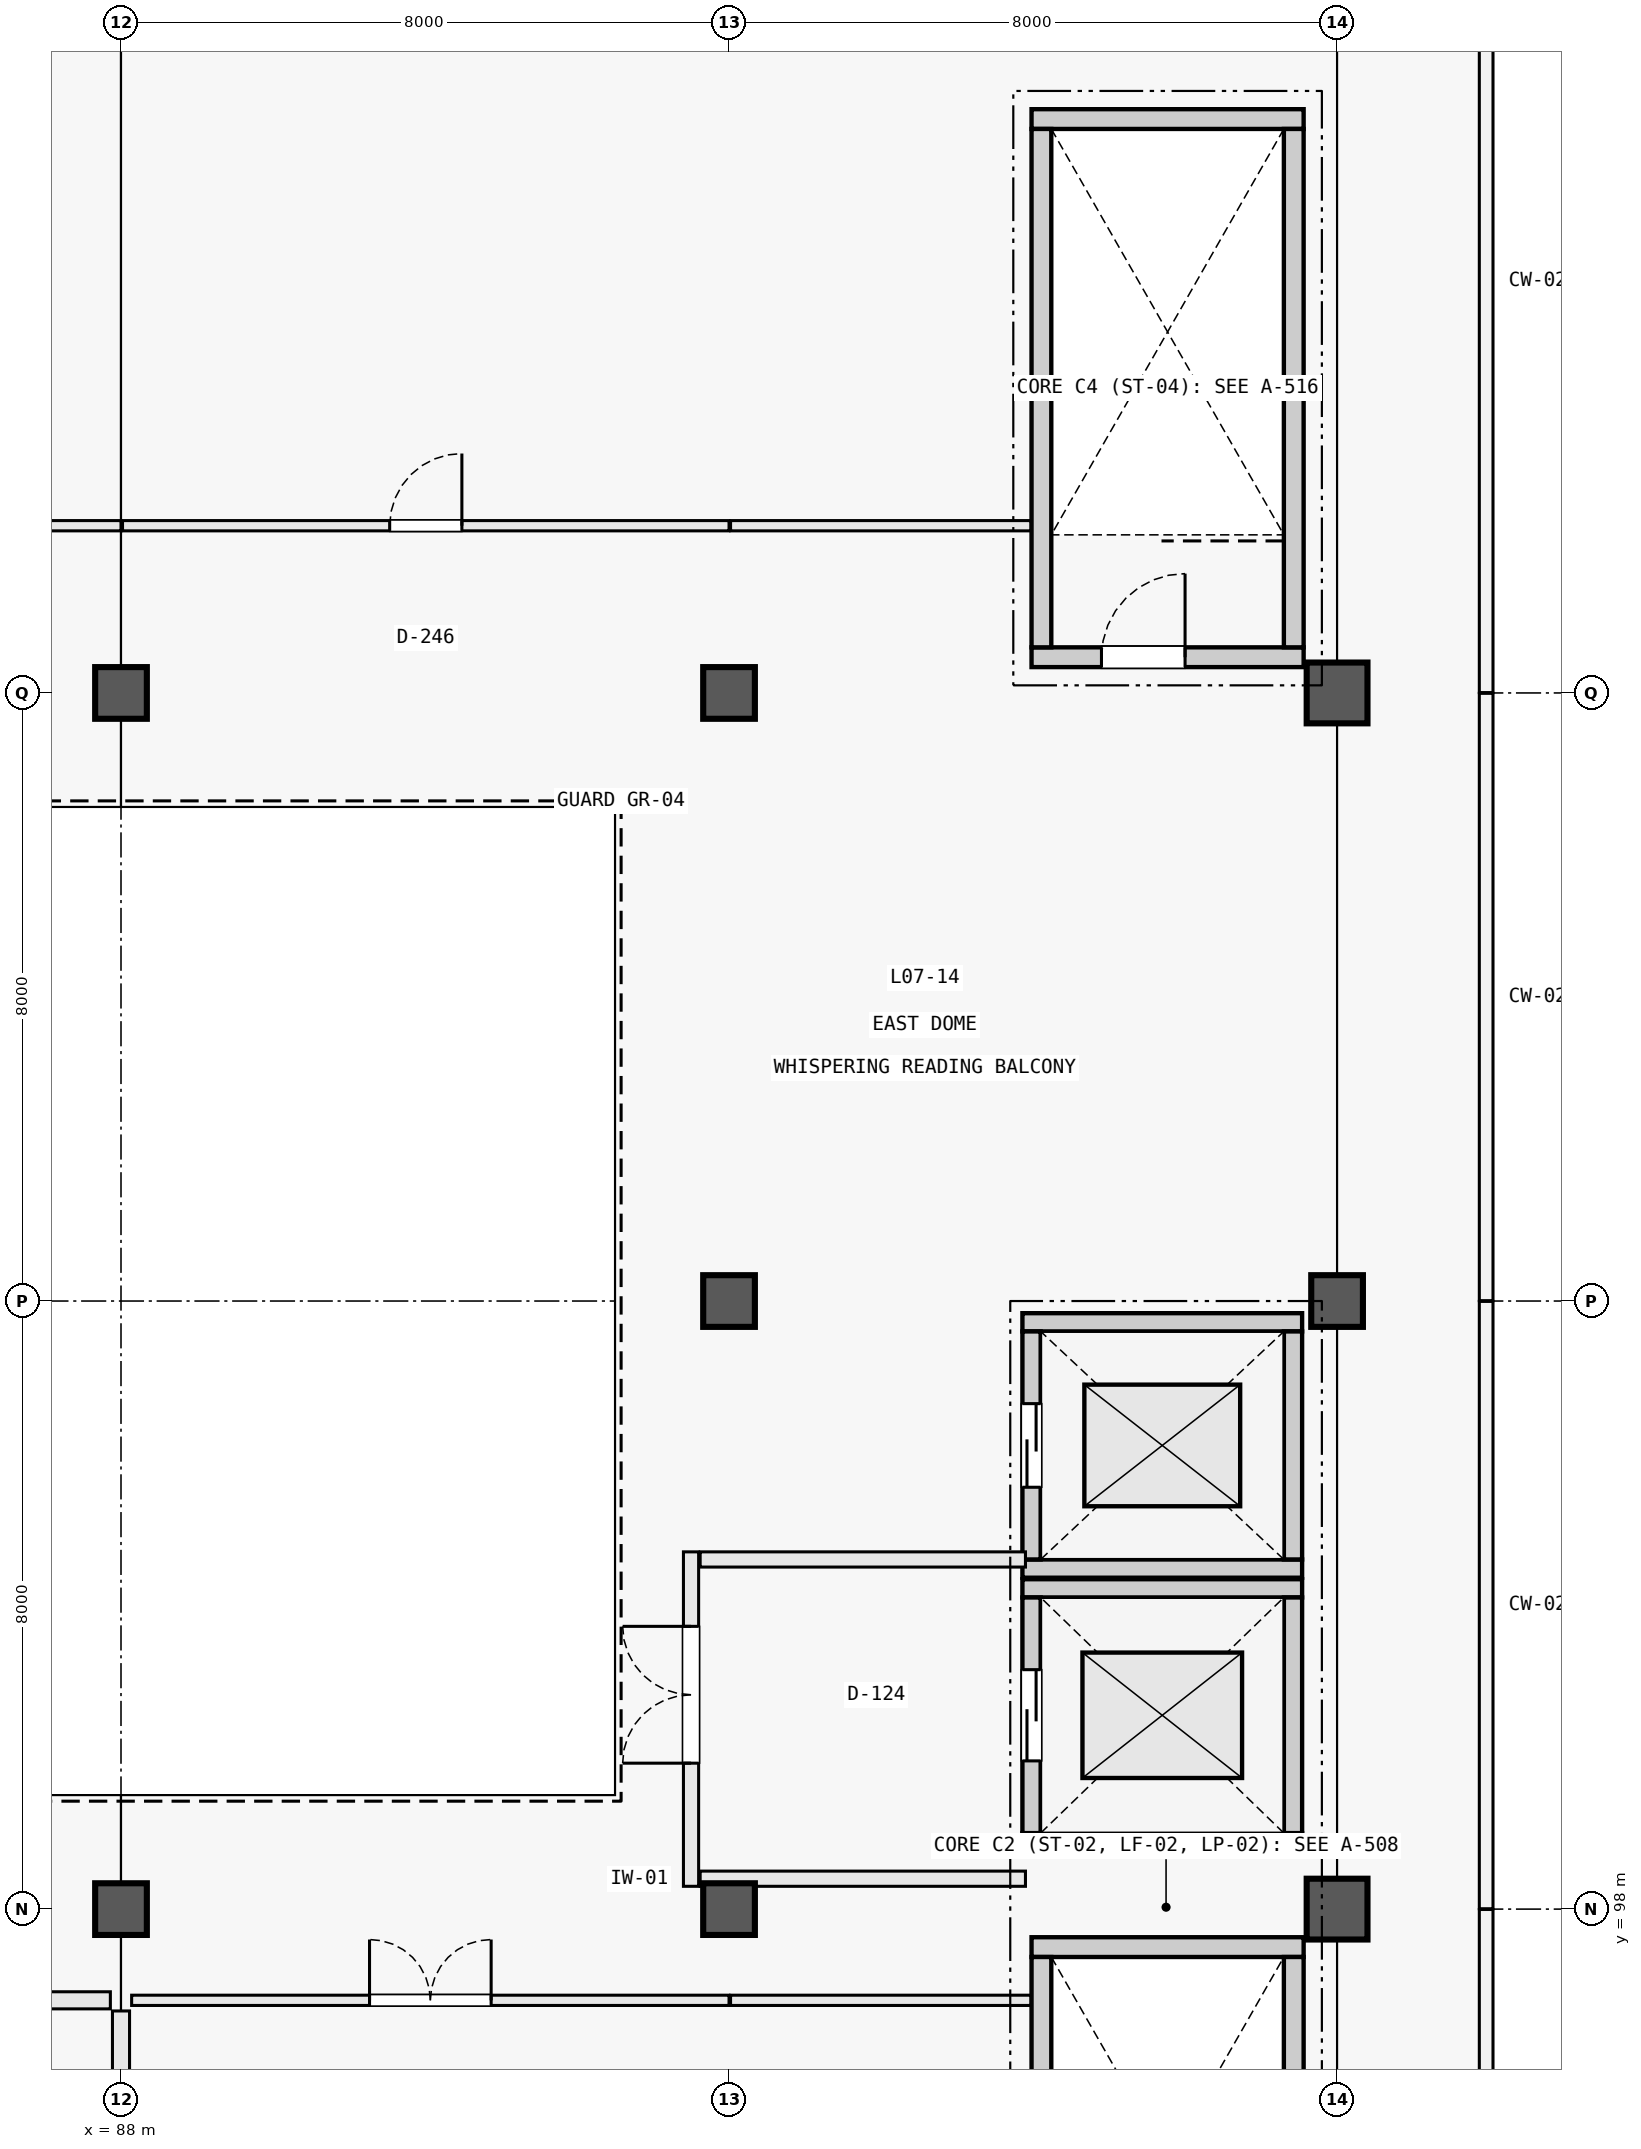
"""IFC4 building model, lengths in metres.
Left out: names, types, materials, properties, quantities, classifications, styles, units other than length and angle.
Written with IfcOpenShell. Run it as: python <this file> out.ifc"""

import sys

from ifc_helpers import new_model, si_unit, direction, frame, frame_2d, origin, origin_2d, place, context, subcontext, project, spatial, rectangle, circle, extrude, element, fill, save


model = new_model("IFC4")
c1 = context("Model", 3, precision=1e-05, world=origin(), true_north=direction((0.0, 1.0)))
c2 = subcontext(c1, "Body", "Model", "MODEL_VIEW")
j1 = project(units=[si_unit("LENGTHUNIT", "METRE"), si_unit("PLANEANGLEUNIT", "RADIAN")], contexts=[c1])
p1 = place(None, origin())
s1 = spatial("IfcSite", under=j1, at=p1, CompositionType="ELEMENT")
p2 = place(p1, origin())
s2 = spatial("IfcBuilding", under=s1, at=p2, CompositionType="ELEMENT")
p3 = place(p2, frame((0.0, 0.0, 30.3)))
s3 = spatial("IfcBuildingStorey", under=s2, at=p3, CompositionType="ELEMENT", Elevation=30.3)
for number, where, z_axis, x_axis in (
    (1, (88.0, 98.0, 0.0), (0.0, 0.0, 1.0), (1.0, 0.0, 0.0)),
    (2, (88.0, 114.0, 0.0), (0.0, 0.0, 1.0), (1.0, 0.0, 0.0)),
    (3, (96.0, 98.0, 0.0), (0.0, 0.0, 1.0), (1.0, 0.0, 0.0)),
    (4, (96.0, 106.0, 0.0), (0.0, 0.0, 1.0), (1.0, 0.0, 0.0)),
    (5, (96.0, 114.0, 0.0), (0.0, 0.0, 1.0), (1.0, 0.0, 0.0)),
):
    element("IfcColumn", number, at=place(p3, frame(where, z_axis=z_axis, x_axis=x_axis)), inside=s3, PredefinedType="COLUMN", context=c2, shape_type="SweptSolid", body=[
        extrude(circle(Radius=0.34, at=origin_2d()), origin(), (0.0, 0.0, 1.0), 4.5),
    ])
p4 = place(p3, frame((104.0, 98.0, 0.0), z_axis=(0.0, 0.0, 1.0), x_axis=(1.0, 0.0, 0.0)))
e6 = element("IfcColumn", 6, at=p4, inside=s3, PredefinedType="COLUMN", context=c2, shape_type="SweptSolid", body=[
    extrude(rectangle(XDim=0.8, YDim=0.8, at=origin_2d()), origin(), (0.0, 0.0, 1.0), 4.5),
])
p5 = place(p3, frame((104.0, 106.0, 0.0), z_axis=(0.0, 0.0, 1.0), x_axis=(1.0, 0.0, 0.0)))
e7 = element("IfcColumn", 7, at=p5, inside=s3, PredefinedType="COLUMN", context=c2, shape_type="SweptSolid", body=[
    extrude(circle(Radius=0.34, at=origin_2d()), origin(), (0.0, 0.0, 1.0), 4.5),
])
p6 = place(p3, frame((104.0, 114.0, 0.0), z_axis=(0.0, 0.0, 1.0), x_axis=(1.0, 0.0, 0.0)))
e8 = element("IfcColumn", 8, at=p6, inside=s3, PredefinedType="COLUMN", context=c2, shape_type="SweptSolid", body=[
    extrude(rectangle(XDim=0.8, YDim=0.8, at=origin_2d()), origin(), (0.0, 0.0, 1.0), 4.5),
])
p7 = place(p3, frame((99.98, 97.5, 0.0), z_axis=(0.0, 0.0, 1.0), x_axis=(1.0, 0.0, 0.0)))
e9 = element("IfcWall", 9, at=p7, inside=s3, PredefinedType="SOLIDWALL", context=c2, shape_type="SweptSolid", body=[
    extrude(rectangle(XDim=3.58, YDim=0.26, at=frame_2d((1.79, 0.0))), origin(), (0.0, 0.0, 1.0), 4.5),
])
for number, where, z_axis, x_axis in (
    (10, (100.11, 90.55, 0.0), (0.0, 0.0, 1.0), (0.0, 1.0, 0.0)),
    (11, (103.43, 90.55, 0.0), (0.0, 0.0, 1.0), (0.0, 1.0, 0.0)),
):
    element("IfcWall", number, at=place(p3, frame(where, z_axis=z_axis, x_axis=x_axis)), inside=s3, PredefinedType="SOLIDWALL", context=c2, shape_type="SweptSolid", body=[
        extrude(rectangle(XDim=6.82, YDim=0.26, at=frame_2d((3.41, 0.0))), origin(), (0.0, 0.0, 1.0), 4.5),
    ])
p8 = place(p3, frame((99.98, 114.47, 0.0), z_axis=(0.0, 0.0, 1.0), x_axis=(1.0, 0.0, 0.0)))
e12 = element("IfcWall", 12, at=p8, inside=s3, PredefinedType="SOLIDWALL", context=c2, shape_type="SweptSolid", body=[
    extrude(rectangle(XDim=3.58, YDim=0.26, at=frame_2d((1.79, 0.0))), origin(), (0.0, 0.0, 1.0), 4.5),
])
p9 = place(p8, frame((0.92, 0.0, 0.0)))
e13 = element("IfcOpeningElement", 13, at=p9, cuts=e12, PredefinedType="OPENING", context=c2, shape_type="SweptSolid", body=[
    extrude(rectangle(XDim=1.1, YDim=2.2, at=frame_2d((0.55, 1.1))), frame((0.0, 0.142, 0.0), z_axis=(0.0, -1.0, 0.0), x_axis=(1.0, 0.0, 0.0)), (0.0, 0.0, 1.0), 0.284),
])
p10 = place(p3, frame((99.98, 121.55, 0.0), z_axis=(0.0, 0.0, 1.0), x_axis=(1.0, 0.0, 0.0)))
e14 = element("IfcWall", 14, at=p10, inside=s3, PredefinedType="SOLIDWALL", context=c2, shape_type="SweptSolid", body=[
    extrude(rectangle(XDim=3.58, YDim=0.26, at=frame_2d((1.79, 0.0))), origin(), (0.0, 0.0, 1.0), 4.5),
])
for number, where, z_axis, x_axis in (
    (15, (100.11, 114.6, 0.0), (0.0, 0.0, 1.0), (0.0, 1.0, 0.0)),
    (16, (103.43, 114.6, 0.0), (0.0, 0.0, 1.0), (0.0, 1.0, 0.0)),
):
    element("IfcWall", number, at=place(p3, frame(where, z_axis=z_axis, x_axis=x_axis)), inside=s3, PredefinedType="SOLIDWALL", context=c2, shape_type="SweptSolid", body=[
        extrude(rectangle(XDim=6.82, YDim=0.26, at=frame_2d((3.41, 0.0))), origin(), (0.0, 0.0, 1.0), 4.5),
    ])
for number, where, z_axis, x_axis in (
    (17, (99.86, 98.88, 0.0), (0.0, 0.0, 1.0), (1.0, 0.0, 0.0)),
    (18, (99.86, 102.22, 0.0), (0.0, 0.0, 1.0), (1.0, 0.0, 0.0)),
):
    element("IfcWall", number, at=place(p3, frame(where, z_axis=z_axis, x_axis=x_axis)), inside=s3, PredefinedType="SOLIDWALL", context=c2, shape_type="SweptSolid", body=[
        extrude(rectangle(XDim=3.68, YDim=0.24, at=frame_2d((1.84, 0.0))), origin(), (0.0, 0.0, 1.0), 4.5),
    ])
p11 = place(p3, frame((99.98, 99.0, 0.0), z_axis=(0.0, 0.0, 1.0), x_axis=(0.0, 1.0, 0.0)))
e19 = element("IfcWall", 19, at=p11, inside=s3, PredefinedType="SOLIDWALL", context=c2, shape_type="SweptSolid", body=[
    extrude(rectangle(XDim=3.1, YDim=0.24, at=frame_2d((1.55, 0.0))), origin(), (0.0, 0.0, 1.0), 4.5),
])
p12 = place(p11, frame((0.95, 0.0, 0.0)))
e20 = element("IfcOpeningElement", 20, at=p12, cuts=e19, PredefinedType="OPENING", context=c2, shape_type="SweptSolid", body=[
    extrude(rectangle(XDim=1.2, YDim=2.2, at=frame_2d((0.6, 1.1))), frame((0.0, 0.132, 0.0), z_axis=(0.0, -1.0, 0.0), x_axis=(1.0, 0.0, 0.0)), (0.0, 0.0, 1.0), 0.264),
])
p13 = place(p3, frame((103.42, 99.0, 0.0), z_axis=(0.0, 0.0, 1.0), x_axis=(0.0, 1.0, 0.0)))
e21 = element("IfcWall", 21, at=p13, inside=s3, PredefinedType="SOLIDWALL", context=c2, shape_type="SweptSolid", body=[
    extrude(rectangle(XDim=3.1, YDim=0.24, at=frame_2d((1.55, 0.0))), origin(), (0.0, 0.0, 1.0), 4.5),
])
for number, where, z_axis, x_axis in (
    (22, (99.86, 102.48, 0.0), (0.0, 0.0, 1.0), (1.0, 0.0, 0.0)),
    (23, (99.86, 105.72, 0.0), (0.0, 0.0, 1.0), (1.0, 0.0, 0.0)),
):
    element("IfcWall", number, at=place(p3, frame(where, z_axis=z_axis, x_axis=x_axis)), inside=s3, PredefinedType="SOLIDWALL", context=c2, shape_type="SweptSolid", body=[
        extrude(rectangle(XDim=3.68, YDim=0.24, at=frame_2d((1.84, 0.0))), origin(), (0.0, 0.0, 1.0), 4.5),
    ])
p14 = place(p3, frame((99.98, 102.6, 0.0), z_axis=(0.0, 0.0, 1.0), x_axis=(0.0, 1.0, 0.0)))
e24 = element("IfcWall", 24, at=p14, inside=s3, PredefinedType="SOLIDWALL", context=c2, shape_type="SweptSolid", body=[
    extrude(rectangle(XDim=3.0, YDim=0.24, at=frame_2d((1.5, 0.0))), origin(), (0.0, 0.0, 1.0), 4.5),
])
p15 = place(p14, frame((0.95, 0.0, 0.0)))
e25 = element("IfcOpeningElement", 25, at=p15, cuts=e24, PredefinedType="OPENING", context=c2, shape_type="SweptSolid", body=[
    extrude(rectangle(XDim=1.1, YDim=2.2, at=frame_2d((0.55, 1.1))), frame((0.0, 0.132, 0.0), z_axis=(0.0, -1.0, 0.0), x_axis=(1.0, 0.0, 0.0)), (0.0, 0.0, 1.0), 0.264),
])
p16 = place(p3, frame((103.42, 102.6, 0.0), z_axis=(0.0, 0.0, 1.0), x_axis=(0.0, 1.0, 0.0)))
e26 = element("IfcWall", 26, at=p16, inside=s3, PredefinedType="SOLIDWALL", context=c2, shape_type="SweptSolid", body=[
    extrude(rectangle(XDim=3.0, YDim=0.24, at=frame_2d((1.5, 0.0))), origin(), (0.0, 0.0, 1.0), 4.5),
])
for number, where, z_axis, x_axis in (
    (27, (95.62, 98.4, 0.0), (0.0, 0.0, 1.0), (1.0, 0.0, 0.0)),
    (28, (95.62, 102.6, 0.0), (0.0, 0.0, 1.0), (1.0, 0.0, 0.0)),
):
    element("IfcWall", number, at=place(p3, frame(where, z_axis=z_axis, x_axis=x_axis)), inside=s3, PredefinedType="PARTITIONING", context=c2, shape_type="SweptSolid", body=[
        extrude(rectangle(XDim=4.28, YDim=0.2, at=frame_2d((2.14, 0.0))), origin(), (0.0, 0.0, 1.0), 3.28),
    ])
p17 = place(p3, frame((95.5, 98.3, 0.0), z_axis=(0.0, 0.0, 1.0), x_axis=(0.0, 1.0, 0.0)))
e29 = element("IfcWall", 29, at=p17, inside=s3, PredefinedType="PARTITIONING", context=c2, shape_type="SweptSolid", body=[
    extrude(rectangle(XDim=4.4, YDim=0.2, at=frame_2d((2.2, 0.0))), origin(), (0.0, 0.0, 1.0), 3.28),
])
p18 = place(p17, frame((1.62, 0.0, 0.0)))
e30 = element("IfcOpeningElement", 30, at=p18, cuts=e29, PredefinedType="OPENING", context=c2, shape_type="SweptSolid", body=[
    extrude(rectangle(XDim=1.8, YDim=2.25, at=frame_2d((0.9, 1.125))), frame((0.0, 0.112, 0.0), z_axis=(0.0, -1.0, 0.0), x_axis=(1.0, 0.0, 0.0)), (0.0, 0.0, 1.0), 0.224),
])
p19 = place(p3, frame((88.0, 90.35, 0.0), z_axis=(0.0, 0.0, 1.0), x_axis=(0.0, 1.0, 0.0)))
e31 = element("IfcWall", 31, at=p19, inside=s3, PredefinedType="PARTITIONING", context=c2, shape_type="SweptSolid", body=[
    extrude(rectangle(XDim=6.31, YDim=0.225, at=frame_2d((3.155, 0.0))), origin(), (0.0, 0.0, 1.0), 3.11),
])
p20 = place(p3, frame((80.14, 96.8, 0.0), z_axis=(0.0, 0.0, 1.0), x_axis=(1.0, 0.0, 0.0)))
e32 = element("IfcWall", 32, at=p20, inside=s3, PredefinedType="PARTITIONING", context=c2, shape_type="SweptSolid", body=[
    extrude(rectangle(XDim=7.72, YDim=0.225, at=frame_2d((3.86, 0.0))), origin(), (0.0, 0.0, 1.0), 3.11),
])
p21 = place(p20, frame((2.113, 0.0, 0.0)))
e33 = element("IfcOpeningElement", 33, at=p21, cuts=e32, PredefinedType="OPENING", context=c2, shape_type="SweptSolid", body=[
    extrude(rectangle(XDim=0.92, YDim=2.1, at=frame_2d((0.46, 1.05))), frame((0.0, 0.125, 0.0), z_axis=(0.0, -1.0, 0.0), x_axis=(1.0, 0.0, 0.0)), (0.0, 0.0, 1.0), 0.249),
])
p22 = place(p20, frame((4.687, 0.0, 0.0)))
e34 = element("IfcOpeningElement", 34, at=p22, cuts=e32, PredefinedType="OPENING", context=c2, shape_type="SweptSolid", body=[
    extrude(rectangle(XDim=0.92, YDim=2.1, at=frame_2d((0.46, 1.05))), frame((0.0, 0.125, 0.0), z_axis=(0.0, -1.0, 0.0), x_axis=(1.0, 0.0, 0.0)), (0.0, 0.0, 1.0), 0.249),
])
p23 = place(p3, frame((88.14, 96.8, 0.0), z_axis=(0.0, 0.0, 1.0), x_axis=(1.0, 0.0, 0.0)))
e35 = element("IfcWall", 35, at=p23, inside=s3, PredefinedType="PARTITIONING", context=c2, shape_type="SweptSolid", body=[
    extrude(rectangle(XDim=7.86, YDim=0.135, at=frame_2d((3.93, 0.0))), origin(), (0.0, 0.0, 1.0), 3.11),
])
p24 = place(p23, frame((3.13, 0.0, 0.0)))
e36 = element("IfcOpeningElement", 36, at=p24, cuts=e35, PredefinedType="OPENING", context=c2, shape_type="SweptSolid", body=[
    extrude(rectangle(XDim=1.6, YDim=2.2, at=frame_2d((0.8, 1.1))), frame((0.0, 0.08, 0.0), z_axis=(0.0, -1.0, 0.0), x_axis=(1.0, 0.0, 0.0)), (0.0, 0.0, 1.0), 0.159),
])
p25 = place(p3, frame((96.02, 96.8, 0.0), z_axis=(0.0, 0.0, 1.0), x_axis=(1.0, 0.0, 0.0)))
e37 = element("IfcWall", 37, at=p25, inside=s3, PredefinedType="PARTITIONING", context=c2, shape_type="SweptSolid", body=[
    extrude(rectangle(XDim=3.95, YDim=0.135, at=frame_2d((1.975, 0.0))), origin(), (0.0, 0.0, 1.0), 3.11),
])
p26 = place(p3, frame((80.02, 116.2, 0.0), z_axis=(0.0, 0.0, 1.0), x_axis=(1.0, 0.0, 0.0)))
e38 = element("IfcWall", 38, at=p26, inside=s3, PredefinedType="PARTITIONING", context=c2, shape_type="SweptSolid", body=[
    extrude(rectangle(XDim=7.98, YDim=0.135, at=frame_2d((3.99, 0.0))), origin(), (0.0, 0.0, 1.0), 3.11),
])
p27 = place(p26, frame((3.19, 0.0, 0.0)))
e39 = element("IfcOpeningElement", 39, at=p27, cuts=e38, PredefinedType="OPENING", context=c2, shape_type="SweptSolid", body=[
    extrude(rectangle(XDim=1.6, YDim=2.2, at=frame_2d((0.8, 1.1))), frame((0.0, 0.08, 0.0), z_axis=(0.0, -1.0, 0.0), x_axis=(1.0, 0.0, 0.0)), (0.0, 0.0, 1.0), 0.159),
])
p28 = place(p3, frame((88.02, 116.2, 0.0), z_axis=(0.0, 0.0, 1.0), x_axis=(1.0, 0.0, 0.0)))
e40 = element("IfcWall", 40, at=p28, inside=s3, PredefinedType="PARTITIONING", context=c2, shape_type="SweptSolid", body=[
    extrude(rectangle(XDim=7.98, YDim=0.135, at=frame_2d((3.99, 0.0))), origin(), (0.0, 0.0, 1.0), 3.11),
])
p29 = place(p28, frame((3.515, 0.0, 0.0)))
e41 = element("IfcOpeningElement", 41, at=p29, cuts=e40, PredefinedType="OPENING", context=c2, shape_type="SweptSolid", body=[
    extrude(rectangle(XDim=0.95, YDim=2.15, at=frame_2d((0.475, 1.075))), frame((0.0, 0.08, 0.0), z_axis=(0.0, -1.0, 0.0), x_axis=(1.0, 0.0, 0.0)), (0.0, 0.0, 1.0), 0.159),
])
p30 = place(p3, frame((96.02, 116.2, 0.0), z_axis=(0.0, 0.0, 1.0), x_axis=(1.0, 0.0, 0.0)))
e42 = element("IfcWall", 42, at=p30, inside=s3, PredefinedType="PARTITIONING", context=c2, shape_type="SweptSolid", body=[
    extrude(rectangle(XDim=3.95, YDim=0.135, at=frame_2d((1.975, 0.0))), origin(), (0.0, 0.0, 1.0), 3.11),
])
p31 = place(p9, origin())
e43 = element("IfcDoor", 43, at=p31, inside=s3, OperationType="SINGLE_SWING_RIGHT", PredefinedType="DOOR", context=c2, shape_type="SweptSolid", body=[
    extrude(rectangle(XDim=1.1, YDim=2.2, at=frame_2d((0.55, 1.1))), frame((0.0, 0.025, 0.0), z_axis=(0.0, -1.0, 0.0), x_axis=(1.0, 0.0, 0.0)), (0.0, 0.0, 1.0), 0.05),
])
fill(e13, e43)
p32 = place(p12, origin())
e44 = element("IfcDoor", 44, at=p32, inside=s3, OperationType="DOUBLE_DOOR_SLIDING", PredefinedType="DOOR", context=c2, shape_type="SweptSolid", body=[
    extrude(rectangle(XDim=1.2, YDim=2.2, at=frame_2d((0.6, 1.1))), frame((0.0, 0.025, 0.0), z_axis=(0.0, -1.0, 0.0), x_axis=(1.0, 0.0, 0.0)), (0.0, 0.0, 1.0), 0.05),
])
fill(e20, e44)
p33 = place(p15, origin())
e45 = element("IfcDoor", 45, at=p33, inside=s3, OperationType="DOUBLE_DOOR_SLIDING", PredefinedType="DOOR", context=c2, shape_type="SweptSolid", body=[
    extrude(rectangle(XDim=1.1, YDim=2.2, at=frame_2d((0.55, 1.1))), frame((0.0, 0.025, 0.0), z_axis=(0.0, -1.0, 0.0), x_axis=(1.0, 0.0, 0.0)), (0.0, 0.0, 1.0), 0.05),
])
fill(e25, e45)
p34 = place(p18, origin())
e46 = element("IfcDoor", 46, at=p34, inside=s3, OperationType="DOUBLE_DOOR_SINGLE_SWING", PredefinedType="DOOR", context=c2, shape_type="SweptSolid", body=[
    extrude(rectangle(XDim=1.8, YDim=2.25, at=frame_2d((0.9, 1.125))), frame((0.0, 0.025, 0.0), z_axis=(0.0, -1.0, 0.0), x_axis=(1.0, 0.0, 0.0)), (0.0, 0.0, 1.0), 0.05),
])
fill(e30, e46)
p35 = place(p24, origin())
e47 = element("IfcDoor", 47, at=p35, inside=s3, OperationType="DOUBLE_DOOR_SINGLE_SWING", PredefinedType="DOOR", context=c2, shape_type="SweptSolid", body=[
    extrude(rectangle(XDim=1.6, YDim=2.2, at=frame_2d((0.8, 1.1))), frame((0.0, 0.025, 0.0), z_axis=(0.0, -1.0, 0.0), x_axis=(1.0, 0.0, 0.0)), (0.0, 0.0, 1.0), 0.05),
])
fill(e36, e47)
p36 = place(p29, origin())
e48 = element("IfcDoor", 48, at=p36, inside=s3, OperationType="SINGLE_SWING_RIGHT", PredefinedType="DOOR", context=c2, shape_type="SweptSolid", body=[
    extrude(rectangle(XDim=0.95, YDim=2.15, at=frame_2d((0.475, 1.075))), frame((0.0, 0.025, 0.0), z_axis=(0.0, -1.0, 0.0), x_axis=(1.0, 0.0, 0.0)), (0.0, 0.0, 1.0), 0.05),
])
fill(e41, e48)
save(model, sys.argv[1])
